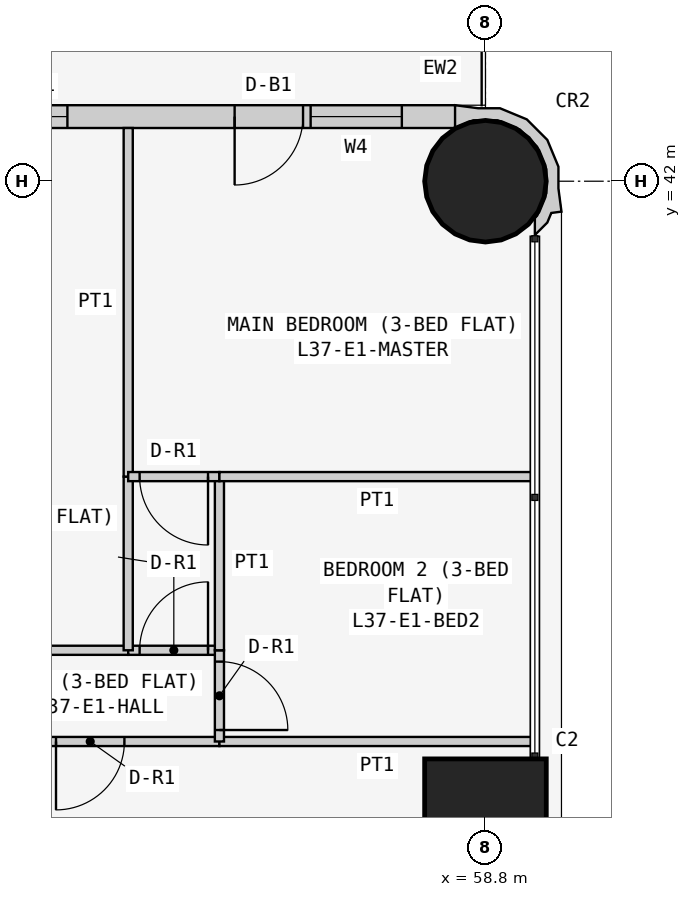
"""IFC4 building model, lengths in metres.
Left out: names, types, materials, properties, quantities, classifications, styles, units other than length and angle.
Written with IfcOpenShell. Run it as: python <this file> out.ifc"""

import sys

from ifc_helpers import new_model, si_unit, direction, frame, frame_2d, origin, origin_2d, place, context, subcontext, project, spatial, polyline, rectangle, circle, outline, extrude, element, fill, save


model = new_model("IFC4")
c1 = context("Model", 3, precision=1e-05, world=origin(), true_north=direction((0.0, 1.0)))
c2 = subcontext(c1, "Body", "Model", "MODEL_VIEW")
j1 = project(units=[si_unit("LENGTHUNIT", "METRE"), si_unit("PLANEANGLEUNIT", "RADIAN")], contexts=[c1])
p1 = place(None, origin())
s1 = spatial("IfcSite", under=j1, at=p1, CompositionType="ELEMENT")
p2 = place(p1, origin())
s2 = spatial("IfcBuilding", under=s1, at=p2, CompositionType="ELEMENT")
p3 = place(p2, frame((0.0, 0.0, 144.9)))
s3 = spatial("IfcBuildingStorey", under=s2, at=p3, CompositionType="ELEMENT", Elevation=144.9)
p4 = place(p3, frame((58.8, 33.6, 0.0), z_axis=(0.0, 0.0, 1.0), x_axis=(1.0, 0.0, 0.0)))
e1 = element("IfcColumn", 1, at=p4, inside=s3, PredefinedType="COLUMN", context=c2, shape_type="SweptSolid", body=[
    extrude(rectangle(XDim=1.6, YDim=1.6, at=origin_2d()), origin(), (0.0, 0.0, 1.0), 3.6),
])
p5 = place(p3, frame((58.8, 42.0, 0.0), z_axis=(0.0, 0.0, 1.0), x_axis=(1.0, 0.0, 0.0)))
e2 = element("IfcColumn", 2, at=p5, inside=s3, PredefinedType="COLUMN", context=c2, shape_type="SweptSolid", body=[
    extrude(circle(Radius=0.8, at=origin_2d()), origin(), (0.0, 0.0, 1.0), 3.6),
])
p6 = place(p3, frame((58.4, 42.85, 0.0), z_axis=(0.0, 0.0, 1.0), x_axis=(-1.0, 0.0, 0.0)))
e3 = element("IfcWall", 3, at=p6, inside=s3, PredefinedType="SOLIDWALL", context=c2, shape_type="SweptSolid", body=[
    extrude(rectangle(XDim=15.7, YDim=0.3, at=frame_2d((7.85, 0.0))), origin(), (0.0, 0.0, 1.0), 3.45),
])
p7 = place(p6, frame((12.4, 0.0, 0.9)))
e4 = element("IfcOpeningElement", 4, at=p7, cuts=e3, PredefinedType="OPENING", context=c2, shape_type="SweptSolid", body=[
    extrude(rectangle(XDim=1.8, YDim=1.5, at=frame_2d((0.9, 0.75))), frame((0.0, 0.16, 0.0), z_axis=(0.0, -1.0, 0.0), x_axis=(1.0, 0.0, 0.0)), (0.0, 0.0, 1.0), 0.32),
])
p8 = place(p6, frame((9.55, 0.0, 1.5)))
e5 = element("IfcOpeningElement", 5, at=p8, cuts=e3, PredefinedType="OPENING", context=c2, shape_type="SweptSolid", body=[
    extrude(rectangle(XDim=0.9, YDim=0.7, at=frame_2d((0.45, 0.35))), frame((0.0, 0.16, 0.0), z_axis=(0.0, -1.0, 0.0), x_axis=(1.0, 0.0, 0.0)), (0.0, 0.0, 1.0), 0.32),
])
p9 = place(p6, frame((5.1, 0.0, 0.9)))
e6 = element("IfcOpeningElement", 6, at=p9, cuts=e3, PredefinedType="OPENING", context=c2, shape_type="SweptSolid", body=[
    extrude(rectangle(XDim=1.8, YDim=1.5, at=frame_2d((0.9, 0.75))), frame((0.0, 0.16, 0.0), z_axis=(0.0, -1.0, 0.0), x_axis=(1.0, 0.0, 0.0)), (0.0, 0.0, 1.0), 0.32),
])
p10 = place(p6, frame((2.0, 0.0, 0.0)))
e7 = element("IfcOpeningElement", 7, at=p10, cuts=e3, PredefinedType="OPENING", context=c2, shape_type="SweptSolid", body=[
    extrude(rectangle(XDim=0.9, YDim=2.4, at=frame_2d((0.45, 1.2))), frame((0.0, 0.16, 0.0), z_axis=(0.0, -1.0, 0.0), x_axis=(1.0, 0.0, 0.0)), (0.0, 0.0, 1.0), 0.32),
])
p11 = place(p6, frame((0.7, 0.0, 0.9)))
e8 = element("IfcOpeningElement", 8, at=p11, cuts=e3, PredefinedType="OPENING", context=c2, shape_type="SweptSolid", body=[
    extrude(rectangle(XDim=1.2, YDim=1.5, at=frame_2d((0.6, 0.75))), frame((0.0, 0.16, 0.0), z_axis=(0.0, -1.0, 0.0), x_axis=(1.0, 0.0, 0.0)), (0.0, 0.0, 1.0), 0.32),
])
p12 = place(p3, frame((59.395, 41.352, 0.0), z_axis=(0.0, 0.0, 1.0), x_axis=(0.93923434088, 0.343276641956, 0.0)))
e9 = element("IfcWall", 9, at=p12, inside=s3, PredefinedType="SOLIDWALL", context=c2, shape_type="SweptSolid", body=[
    extrude(outline(polyline([(0.532, 0.393), (0.631, 0.663), (0.614, 1.044), (0.453, 1.391), (0.172, 1.649), (-0.097, 1.748), (-0.369, 1.89), (-0.509, 1.621), (-0.491, 1.615), (-0.479, 1.609), (-0.211, 1.62), (0.088, 1.511), (0.323, 1.295), (0.457, 1.006), (0.47, 0.688), (0.361, 0.389), (0.145, 0.154), (0.108, 0.136), (0.031, -0.075), (0.241, 0.023), (0.333, 0.124), (0.465, 0.094), (0.532, 0.393)])), origin(), (0.0, 0.0, 1.0), 3.45),
])
p13 = place(p3, frame((55.3, 34.629, 0.0), z_axis=(0.0, 0.0, 1.0), x_axis=(-1.0, 0.0, 0.0)))
e10 = element("IfcWall", 10, at=p13, inside=s3, PredefinedType="PARTITIONING", context=c2, shape_type="SweptSolid", body=[
    extrude(rectangle(XDim=2.7, YDim=0.12, at=frame_2d((1.35, 0.0))), origin(), (0.0, 0.0, 1.0), 3.45),
])
p14 = place(p13, frame((1.25, 0.0, 0.0)))
e11 = element("IfcOpeningElement", 11, at=p14, cuts=e10, PredefinedType="OPENING", context=c2, shape_type="SweptSolid", body=[
    extrude(rectangle(XDim=0.9, YDim=2.1, at=frame_2d((0.45, 1.05))), frame((0.0, 0.07, 0.0), z_axis=(0.0, -1.0, 0.0), x_axis=(1.0, 0.0, 0.0)), (0.0, 0.0, 1.0), 0.14),
])
p15 = place(p3, frame((59.45, 34.629, 0.0), z_axis=(0.0, 0.0, 1.0), x_axis=(-1.0, 0.0, 0.0)))
e12 = element("IfcWall", 12, at=p15, inside=s3, PredefinedType="PARTITIONING", context=c2, shape_type="SweptSolid", body=[
    extrude(rectangle(XDim=4.15, YDim=0.12, at=frame_2d((2.075, 0.0))), origin(), (0.0, 0.0, 1.0), 3.45),
])
p16 = place(p3, frame((54.1, 35.829, 0.0), z_axis=(0.0, 0.0, 1.0), x_axis=(-1.0, 0.0, 0.0)))
e13 = element("IfcWall", 13, at=p16, inside=s3, PredefinedType="PARTITIONING", context=c2, shape_type="SweptSolid", body=[
    extrude(rectangle(XDim=4.9, YDim=0.12, at=frame_2d((2.45, 0.0))), origin(), (0.0, 0.0, 1.0), 3.45),
])
p17 = place(p16, frame((1.65, 0.0, 0.0)))
e14 = element("IfcOpeningElement", 14, at=p17, cuts=e13, PredefinedType="OPENING", context=c2, shape_type="SweptSolid", body=[
    extrude(rectangle(XDim=0.9, YDim=2.1, at=frame_2d((0.45, 1.05))), frame((0.0, 0.07, 0.0), z_axis=(0.0, -1.0, 0.0), x_axis=(1.0, 0.0, 0.0)), (0.0, 0.0, 1.0), 0.14),
])
p18 = place(p3, frame((55.3, 35.829, 0.0), z_axis=(0.0, 0.0, 1.0), x_axis=(-1.0, 0.0, 0.0)))
e15 = element("IfcWall", 15, at=p18, inside=s3, PredefinedType="PARTITIONING", context=c2, shape_type="SweptSolid", body=[
    extrude(rectangle(XDim=1.2, YDim=0.12, at=frame_2d((0.6, 0.0))), origin(), (0.0, 0.0, 1.0), 3.45),
])
p19 = place(p18, frame((0.15, 0.0, 0.0)))
e16 = element("IfcOpeningElement", 16, at=p19, cuts=e15, PredefinedType="OPENING", context=c2, shape_type="SweptSolid", body=[
    extrude(rectangle(XDim=0.9, YDim=2.1, at=frame_2d((0.45, 1.05))), frame((0.0, 0.07, 0.0), z_axis=(0.0, -1.0, 0.0), x_axis=(1.0, 0.0, 0.0)), (0.0, 0.0, 1.0), 0.14),
])
p20 = place(p3, frame((55.3, 34.629, 0.0), z_axis=(0.0, 0.0, 1.0), x_axis=(0.0, 1.0, 0.0)))
e17 = element("IfcWall", 17, at=p20, inside=s3, PredefinedType="PARTITIONING", context=c2, shape_type="SweptSolid", body=[
    extrude(rectangle(XDim=1.2, YDim=0.12, at=frame_2d((0.6, 0.0))), origin(), (0.0, 0.0, 1.0), 3.45),
])
p21 = place(p20, frame((0.151, 0.0, 0.0)))
e18 = element("IfcOpeningElement", 18, at=p21, cuts=e17, PredefinedType="OPENING", context=c2, shape_type="SweptSolid", body=[
    extrude(rectangle(XDim=0.9, YDim=2.1, at=frame_2d((0.45, 1.05))), frame((0.0, 0.07, 0.0), z_axis=(0.0, -1.0, 0.0), x_axis=(1.0, 0.0, 0.0)), (0.0, 0.0, 1.0), 0.14),
])
p22 = place(p3, frame((54.1, 35.829, 0.0), z_axis=(0.0, 0.0, 1.0), x_axis=(0.0, 1.0, 0.0)))
e19 = element("IfcWall", 19, at=p22, inside=s3, PredefinedType="PARTITIONING", context=c2, shape_type="SweptSolid", body=[
    extrude(rectangle(XDim=2.285, YDim=0.12, at=frame_2d((1.143, 0.0))), origin(), (0.0, 0.0, 1.0), 3.45),
])
p23 = place(p3, frame((54.1, 38.114, 0.0), z_axis=(0.0, 0.0, 1.0), x_axis=(0.0, 1.0, 0.0)))
e20 = element("IfcWall", 20, at=p23, inside=s3, PredefinedType="PARTITIONING", context=c2, shape_type="SweptSolid", body=[
    extrude(rectangle(XDim=4.586, YDim=0.12, at=frame_2d((2.293, 0.0))), origin(), (0.0, 0.0, 1.0), 3.45),
])
p24 = place(p3, frame((55.3, 35.829, 0.0), z_axis=(0.0, 0.0, 1.0), x_axis=(0.0, 1.0, 0.0)))
e21 = element("IfcWall", 21, at=p24, inside=s3, PredefinedType="PARTITIONING", context=c2, shape_type="SweptSolid", body=[
    extrude(rectangle(XDim=2.285, YDim=0.12, at=frame_2d((1.143, 0.0))), origin(), (0.0, 0.0, 1.0), 3.45),
])
p25 = place(p3, frame((55.3, 38.114, 0.0), z_axis=(0.0, 0.0, 1.0), x_axis=(-1.0, 0.0, 0.0)))
e22 = element("IfcWall", 22, at=p25, inside=s3, PredefinedType="PARTITIONING", context=c2, shape_type="SweptSolid", body=[
    extrude(rectangle(XDim=1.2, YDim=0.12, at=frame_2d((0.6, 0.0))), origin(), (0.0, 0.0, 1.0), 3.45),
])
p26 = place(p25, frame((0.15, 0.0, 0.0)))
e23 = element("IfcOpeningElement", 23, at=p26, cuts=e22, PredefinedType="OPENING", context=c2, shape_type="SweptSolid", body=[
    extrude(rectangle(XDim=0.9, YDim=2.1, at=frame_2d((0.45, 1.05))), frame((0.0, 0.07, 0.0), z_axis=(0.0, -1.0, 0.0), x_axis=(1.0, 0.0, 0.0)), (0.0, 0.0, 1.0), 0.14),
])
p27 = place(p3, frame((59.45, 38.114, 0.0), z_axis=(0.0, 0.0, 1.0), x_axis=(-1.0, 0.0, 0.0)))
e24 = element("IfcWall", 24, at=p27, inside=s3, PredefinedType="PARTITIONING", context=c2, shape_type="SweptSolid", body=[
    extrude(rectangle(XDim=4.15, YDim=0.12, at=frame_2d((2.075, 0.0))), origin(), (0.0, 0.0, 1.0), 3.45),
])
p28 = place(p9, origin())
e25 = element("IfcWindow", 25, at=p28, inside=s3, PartitioningType="SINGLE_PANEL", PredefinedType="WINDOW", context=c2, shape_type="SweptSolid", body=[
    extrude(rectangle(XDim=1.8, YDim=1.5, at=frame_2d((0.9, 0.75))), frame((0.0, 0.03, 0.0), z_axis=(0.0, -1.0, 0.0), x_axis=(1.0, 0.0, 0.0)), (0.0, 0.0, 1.0), 0.06),
])
fill(e6, e25)
p29 = place(p10, origin())
e26 = element("IfcDoor", 26, at=p29, inside=s3, OperationType="SINGLE_SWING_RIGHT", PredefinedType="DOOR", context=c2, shape_type="SweptSolid", body=[
    extrude(rectangle(XDim=0.9, YDim=2.4, at=frame_2d((0.45, 1.2))), frame((0.0, 0.025, 0.0), z_axis=(0.0, -1.0, 0.0), x_axis=(1.0, 0.0, 0.0)), (0.0, 0.0, 1.0), 0.05),
])
fill(e7, e26)
p30 = place(p11, origin())
e27 = element("IfcWindow", 27, at=p30, inside=s3, PartitioningType="SINGLE_PANEL", PredefinedType="WINDOW", context=c2, shape_type="SweptSolid", body=[
    extrude(rectangle(XDim=1.2, YDim=1.5, at=frame_2d((0.6, 0.75))), frame((0.0, 0.03, 0.0), z_axis=(0.0, -1.0, 0.0), x_axis=(1.0, 0.0, 0.0)), (0.0, 0.0, 1.0), 0.06),
])
fill(e8, e27)
p31 = place(p14, origin())
e28 = element("IfcDoor", 28, at=p31, inside=s3, OperationType="SINGLE_SWING_RIGHT", PredefinedType="DOOR", context=c2, shape_type="SweptSolid", body=[
    extrude(rectangle(XDim=0.9, YDim=2.1, at=frame_2d((0.45, 1.05))), frame((0.0, 0.025, 0.0), z_axis=(0.0, -1.0, 0.0), x_axis=(1.0, 0.0, 0.0)), (0.0, 0.0, 1.0), 0.05),
])
fill(e11, e28)
p32 = place(p19, frame((0.9, 0.0, 0.0), z_axis=(0.0, 0.0, 1.0), x_axis=(-1.0, 0.0, 0.0)))
e29 = element("IfcDoor", 29, at=p32, inside=s3, OperationType="SINGLE_SWING_RIGHT", PredefinedType="DOOR", context=c2, shape_type="SweptSolid", body=[
    extrude(rectangle(XDim=0.9, YDim=2.1, at=frame_2d((0.45, 1.05))), frame((0.0, 0.025, 0.0), z_axis=(0.0, -1.0, 0.0), x_axis=(1.0, 0.0, 0.0)), (0.0, 0.0, 1.0), 0.05),
])
fill(e16, e29)
p33 = place(p26, origin())
e30 = element("IfcDoor", 30, at=p33, inside=s3, OperationType="SINGLE_SWING_LEFT", PredefinedType="DOOR", context=c2, shape_type="SweptSolid", body=[
    extrude(rectangle(XDim=0.9, YDim=2.1, at=frame_2d((0.45, 1.05))), frame((0.0, 0.025, 0.0), z_axis=(0.0, -1.0, 0.0), x_axis=(1.0, 0.0, 0.0)), (0.0, 0.0, 1.0), 0.05),
])
fill(e23, e30)
p34 = place(p21, frame((0.9, 0.0, 0.0), z_axis=(0.0, 0.0, 1.0), x_axis=(-1.0, 0.0, 0.0)))
e31 = element("IfcDoor", 31, at=p34, inside=s3, OperationType="SINGLE_SWING_RIGHT", PredefinedType="DOOR", context=c2, shape_type="SweptSolid", body=[
    extrude(rectangle(XDim=0.9, YDim=2.1, at=frame_2d((0.45, 1.05))), frame((0.0, 0.025, 0.0), z_axis=(0.0, -1.0, 0.0), x_axis=(1.0, 0.0, 0.0)), (0.0, 0.0, 1.0), 0.05),
])
fill(e18, e31)
save(model, sys.argv[1])
